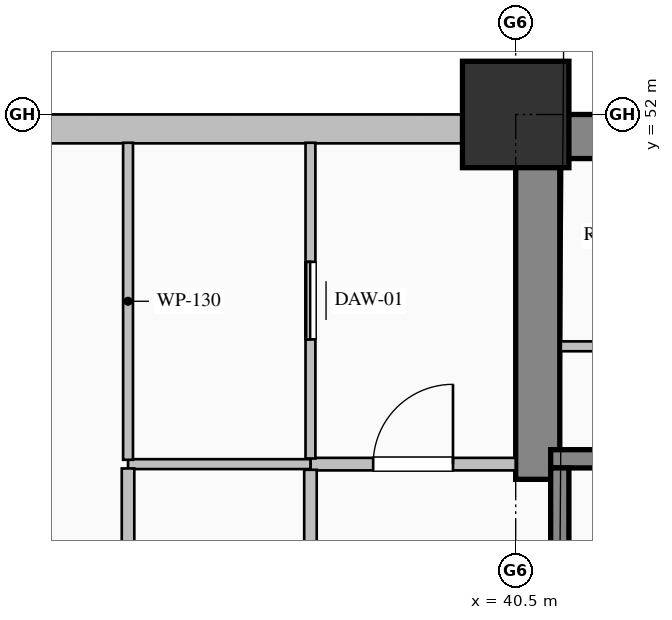
"""IFC4 building model, lengths in metres.
Left out: names, types, materials, properties, quantities, classifications, styles, units other than length and angle.
Written with IfcOpenShell. Run it as: python <this file> out.ifc"""

import sys

from ifc_helpers import new_model, si_unit, direction, frame, frame_2d, origin, origin_2d, place, context, subcontext, project, spatial, rectangle, hollow_rectangle, extrude, element, fill, save


model = new_model("IFC4")
c1 = context("Model", 3, precision=1e-05, world=origin(), true_north=direction((0.0, 1.0)))
c2 = subcontext(c1, "Body", "Model", "MODEL_VIEW")
j1 = project(units=[si_unit("LENGTHUNIT", "METRE"), si_unit("PLANEANGLEUNIT", "RADIAN")], contexts=[c1])
p1 = place(None, origin())
s1 = spatial("IfcSite", under=j1, at=p1, CompositionType="ELEMENT")
p2 = place(p1, origin())
s2 = spatial("IfcBuilding", under=s1, at=p2, CompositionType="ELEMENT")
p3 = place(p2, frame((0.0, 0.0, 22.8)))
s3 = spatial("IfcBuildingStorey", under=s2, at=p3, CompositionType="ELEMENT", Elevation=22.8)
p4 = place(p3, frame((40.5, 51.71, 0.0), z_axis=(0.0, 0.0, 1.0), x_axis=(1.0, 0.0, 0.0)))
e1 = element("IfcWall", 1, at=p4, inside=s3, PredefinedType="SHEAR", context=c2, shape_type="SweptSolid", body=[
    extrude(rectangle(XDim=23.5, YDim=0.58, at=frame_2d((11.75, 0.0))), origin(), (0.0, 0.0, 1.0), 5.15),
])
p5 = place(p3, frame((40.79, 47.2, 0.0), z_axis=(0.0, 0.0, 1.0), x_axis=(0.0, 1.0, 0.0)))
e2 = element("IfcWall", 2, at=p5, inside=s3, PredefinedType="SHEAR", context=c2, shape_type="SweptSolid", body=[
    extrude(rectangle(XDim=4.22, YDim=0.58, at=frame_2d((2.11, 0.0))), origin(), (0.0, 0.0, 1.0), 5.15),
])
p6 = place(p3, frame((40.5, 52.0, 0.0), z_axis=(0.0, 0.0, 1.0), x_axis=(1.0, 0.0, 0.0)))
e3 = element("IfcColumn", 3, at=p6, inside=s3, PredefinedType="COLUMN", context=c2, shape_type="SweptSolid", body=[
    extrude(hollow_rectangle(XDim=1.4, YDim=1.4, WallThickness=0.05, at=origin_2d()), origin(), (0.0, 0.0, 1.0), 5.4),
])
p7 = place(p3, frame((4.0, 51.81, 0.0), z_axis=(0.0, 0.0, 1.0), x_axis=(1.0, 0.0, 0.0)))
e4 = element("IfcWall", 4, at=p7, inside=s3, PredefinedType="SOLIDWALL", context=c2, shape_type="SweptSolid", body=[
    extrude(rectangle(XDim=36.52, YDim=0.38, at=frame_2d((18.26, 0.0))), origin(), (0.0, 0.0, 1.0), 4.65),
])
p8 = place(p7, frame((16.7, 0.0, 0.85)))
e5 = element("IfcOpeningElement", 5, at=p8, cuts=e4, PredefinedType="OPENING", context=c2, shape_type="SweptSolid", body=[
    extrude(rectangle(XDim=2.6, YDim=3.1, at=frame_2d((1.3, 1.55))), frame((0.0, 0.2, 0.0), z_axis=(0.0, -1.0, 0.0), x_axis=(1.0, 0.0, 0.0)), (0.0, 0.0, 1.0), 0.4),
])
p9 = place(p7, frame((24.1, 0.0, 0.9)))
e6 = element("IfcOpeningElement", 6, at=p9, cuts=e4, PredefinedType="OPENING", context=c2, shape_type="SweptSolid", body=[
    extrude(rectangle(XDim=2.2, YDim=2.65, at=frame_2d((1.1, 1.325))), frame((0.0, 0.2, 0.0), z_axis=(0.0, -1.0, 0.0), x_axis=(1.0, 0.0, 0.0)), (0.0, 0.0, 1.0), 0.4),
])
p10 = place(p3, frame((40.96, 47.47, 0.0), z_axis=(0.0, 0.0, 1.0), x_axis=(1.0, 0.0, 0.0)))
e7 = element("IfcWall", 7, at=p10, inside=s3, PredefinedType="SOLIDWALL", context=c2, shape_type="SweptSolid", body=[
    extrude(rectangle(XDim=8.08, YDim=0.24, at=frame_2d((4.04, 0.0))), origin(), (0.0, 0.0, 1.0), 5.4),
])
p11 = place(p3, frame((41.08, 47.35, 0.0), z_axis=(0.0, 0.0, 1.0), x_axis=(0.0, -1.0, 0.0)))
e8 = element("IfcWall", 8, at=p11, inside=s3, PredefinedType="SOLIDWALL", context=c2, shape_type="SweptSolid", body=[
    extrude(rectangle(XDim=3.15, YDim=0.24, at=frame_2d((1.575, 0.0))), origin(), (0.0, 0.0, 1.0), 5.4),
])
p12 = place(p11, frame((1.0, 0.0, 0.0)))
e9 = element("IfcOpeningElement", 9, at=p12, cuts=e8, PredefinedType="OPENING", context=c2, shape_type="SweptSolid", body=[
    extrude(rectangle(XDim=1.15, YDim=2.2, at=frame_2d((0.575, 1.1))), frame((0.0, 0.13, 0.0), z_axis=(0.0, -1.0, 0.0), x_axis=(1.0, 0.0, 0.0)), (0.0, 0.0, 1.0), 0.26),
])
p13 = place(p3, frame((37.8, 47.4, 0.0), z_axis=(0.0, 0.0, 1.0), x_axis=(1.0, 0.0, 0.0)))
e10 = element("IfcWall", 10, at=p13, inside=s3, PredefinedType="PARTITIONING", context=c2, shape_type="SweptSolid", body=[
    extrude(rectangle(XDim=2.7, YDim=0.165, at=frame_2d((1.35, 0.0))), origin(), (0.0, 0.0, 1.0), 5.15),
])
p14 = place(p13, frame((0.825, 0.0, 0.0)))
e11 = element("IfcOpeningElement", 11, at=p14, cuts=e10, PredefinedType="OPENING", context=c2, shape_type="SweptSolid", body=[
    extrude(rectangle(XDim=1.05, YDim=2.15, at=frame_2d((0.525, 1.075))), frame((0.0, 0.093, 0.0), z_axis=(0.0, -1.0, 0.0), x_axis=(1.0, 0.0, 0.0)), (0.0, 0.0, 1.0), 0.185),
])
p15 = place(p3, frame((37.8, 44.2, 0.0), z_axis=(0.0, 0.0, 1.0), x_axis=(0.0, 1.0, 0.0)))
e12 = element("IfcWall", 12, at=p15, inside=s3, PredefinedType="PARTITIONING", context=c2, shape_type="SweptSolid", body=[
    extrude(rectangle(XDim=3.125, YDim=0.165, at=frame_2d((1.563, 0.0))), origin(), (0.0, 0.0, 1.0), 5.15),
])
p16 = place(p15, frame((1.038, 0.0, 0.0)))
e13 = element("IfcOpeningElement", 13, at=p16, cuts=e12, PredefinedType="OPENING", context=c2, shape_type="SweptSolid", body=[
    extrude(rectangle(XDim=1.05, YDim=2.15, at=frame_2d((0.525, 1.075))), frame((0.0, 0.093, 0.0), z_axis=(0.0, -1.0, 0.0), x_axis=(1.0, 0.0, 0.0)), (0.0, 0.0, 1.0), 0.185),
])
p17 = place(p3, frame((37.8, 47.475, 0.0), z_axis=(0.0, 0.0, 1.0), x_axis=(0.0, 1.0, 0.0)))
e14 = element("IfcWall", 14, at=p17, inside=s3, PredefinedType="PARTITIONING", context=c2, shape_type="SweptSolid", body=[
    extrude(rectangle(XDim=4.153, YDim=0.13, at=frame_2d((2.077, 0.0))), origin(), (0.0, 0.0, 1.0), 5.15),
])
p18 = place(p17, frame((1.567, 0.0, 0.0)))
e15 = element("IfcOpeningElement", 15, at=p18, cuts=e14, PredefinedType="OPENING", context=c2, shape_type="SweptSolid", body=[
    extrude(rectangle(XDim=1.02, YDim=2.15, at=frame_2d((0.51, 1.075))), frame((0.0, 0.075, 0.0), z_axis=(0.0, -1.0, 0.0), x_axis=(1.0, 0.0, 0.0)), (0.0, 0.0, 1.0), 0.15),
])
p19 = place(p3, frame((37.8, 47.4, 0.0), z_axis=(0.0, 0.0, 1.0), x_axis=(-1.0, 0.0, 0.0)))
e16 = element("IfcWall", 16, at=p19, inside=s3, PredefinedType="PARTITIONING", context=c2, shape_type="SweptSolid", body=[
    extrude(rectangle(XDim=2.4, YDim=0.13, at=frame_2d((1.2, 0.0))), origin(), (0.0, 0.0, 1.0), 5.15),
])
p20 = place(p3, frame((35.4, 47.457, 0.0), z_axis=(0.0, 0.0, 1.0), x_axis=(0.0, 1.0, 0.0)))
e17 = element("IfcWall", 17, at=p20, inside=s3, PredefinedType="PARTITIONING", context=c2, shape_type="SweptSolid", body=[
    extrude(rectangle(XDim=4.171, YDim=0.13, at=frame_2d((2.085, 0.0))), origin(), (0.0, 0.0, 1.0), 5.15),
])
p21 = place(p3, frame((41.08, 48.95, 0.0), z_axis=(0.0, 0.0, 1.0), x_axis=(1.0, 0.0, 0.0)))
e18 = element("IfcWall", 18, at=p21, inside=s3, PredefinedType="PARTITIONING", context=c2, shape_type="SweptSolid", body=[
    extrude(rectangle(XDim=2.72, YDim=0.13, at=frame_2d((1.36, 0.0))), origin(), (0.0, 0.0, 1.0), 5.15),
])
p22 = place(p21, frame((0.9, 0.0, 0.0)))
e19 = element("IfcOpeningElement", 19, at=p22, cuts=e18, PredefinedType="OPENING", context=c2, shape_type="SweptSolid", body=[
    extrude(rectangle(XDim=0.92, YDim=2.15, at=frame_2d((0.46, 1.075))), frame((0.0, 0.075, 0.0), z_axis=(0.0, -1.0, 0.0), x_axis=(1.0, 0.0, 0.0)), (0.0, 0.0, 1.0), 0.15),
])
p23 = place(p3, frame((35.4, 34.074, 0.0), z_axis=(0.0, 0.0, 1.0), x_axis=(0.0, 1.0, 0.0)))
e20 = element("IfcWall", 20, at=p23, inside=s3, PredefinedType="PARTITIONING", context=c2, shape_type="SweptSolid", body=[
    extrude(rectangle(XDim=13.269, YDim=0.165, at=frame_2d((6.634, 0.0))), origin(), (0.0, 0.0, 1.0), 5.15),
])
p24 = place(p14, origin())
e21 = element("IfcDoor", 21, at=p24, inside=s3, OperationType="SINGLE_SWING_RIGHT", PredefinedType="DOOR", context=c2, shape_type="SweptSolid", body=[
    extrude(rectangle(XDim=1.05, YDim=2.15, at=frame_2d((0.525, 1.075))), frame((0.0, 0.025, 0.0), z_axis=(0.0, -1.0, 0.0), x_axis=(1.0, 0.0, 0.0)), (0.0, 0.0, 1.0), 0.05),
])
fill(e11, e21)
p25 = place(p18, origin())
e22 = element("IfcDoor", 22, at=p25, inside=s3, OperationType="SLIDING_TO_LEFT", PredefinedType="DOOR", context=c2, shape_type="SweptSolid", body=[
    extrude(rectangle(XDim=1.02, YDim=2.15, at=frame_2d((0.51, 1.075))), frame((0.0, 0.025, 0.0), z_axis=(0.0, -1.0, 0.0), x_axis=(1.0, 0.0, 0.0)), (0.0, 0.0, 1.0), 0.05),
])
fill(e15, e22)
save(model, sys.argv[1])
